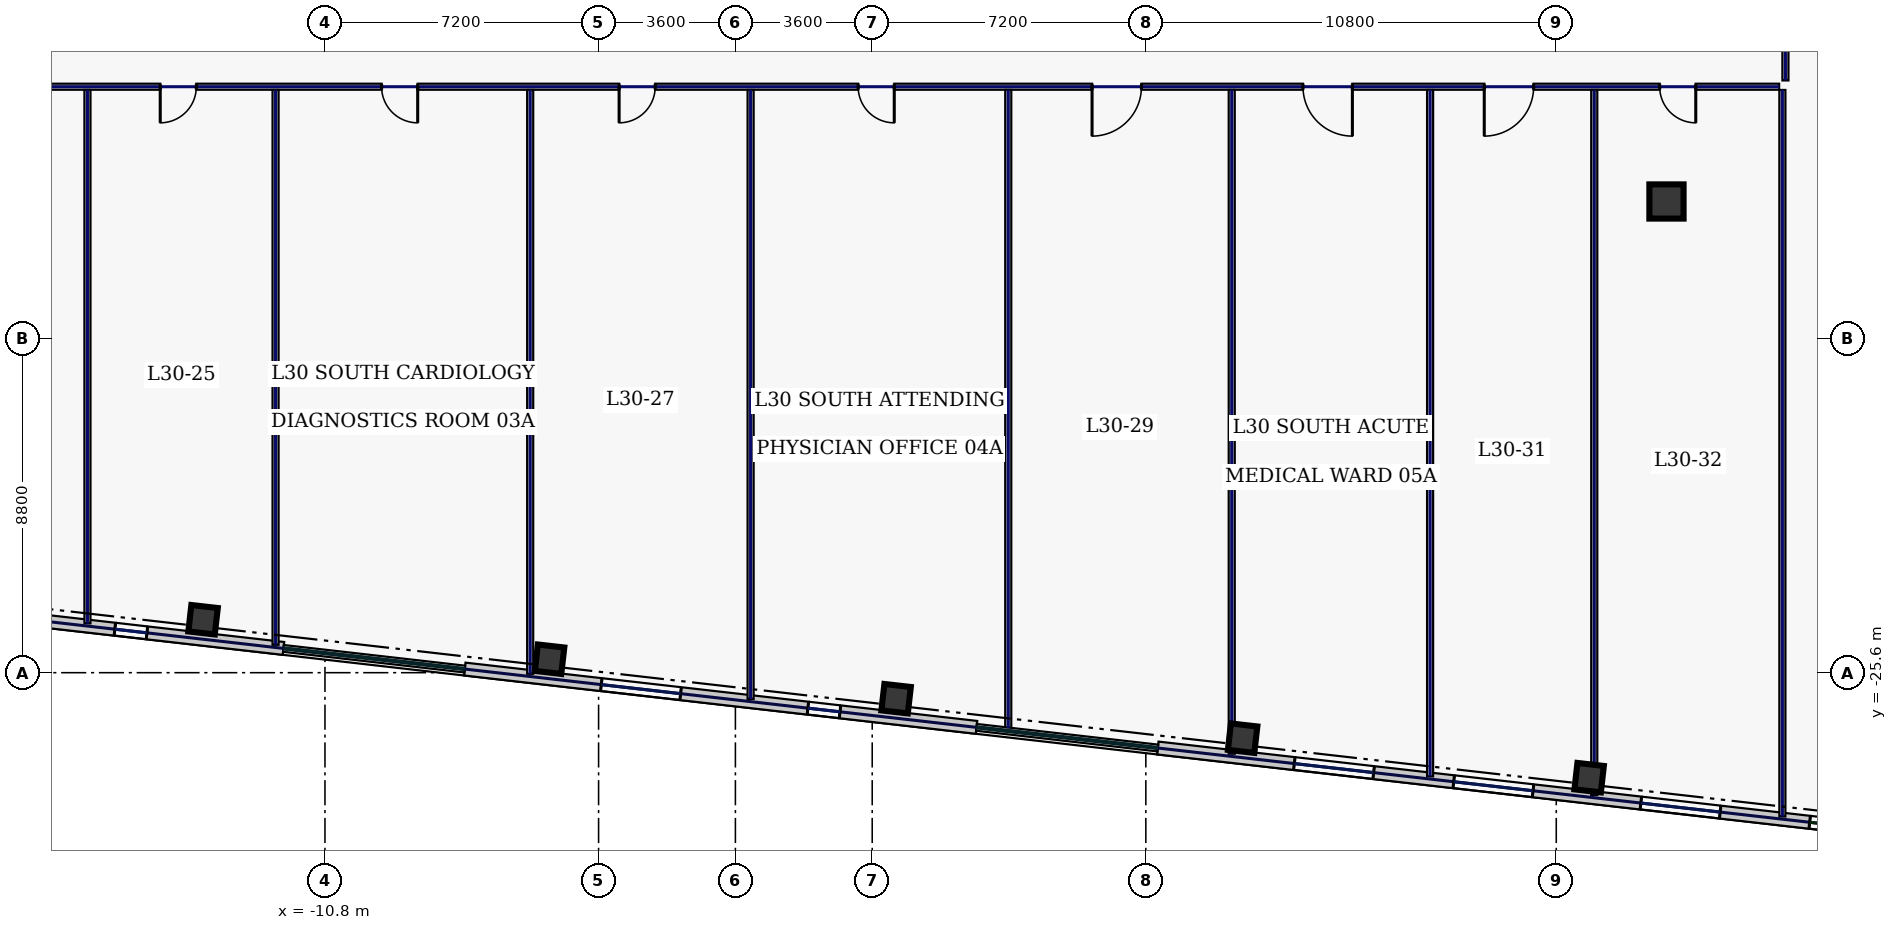
"""IFC4 building model, lengths in metres.
Left out: names, types, materials, properties, quantities, classifications, styles, units other than length and angle.
Written with IfcOpenShell. Run it as: python <this file> out.ifc"""

import sys

from ifc_helpers import new_model, si_unit, direction, frame, frame_2d, origin, origin_2d, place, context, subcontext, project, spatial, rectangle, hollow_rectangle, extrude, element, fill, save


model = new_model("IFC4")
c1 = context("Model", 3, precision=1e-05, world=origin(), true_north=direction((0.0, 1.0)))
c2 = subcontext(c1, "Body", "Model", "MODEL_VIEW")
j1 = project(units=[si_unit("LENGTHUNIT", "METRE"), si_unit("PLANEANGLEUNIT", "RADIAN")], contexts=[c1])
p1 = place(None, origin())
s1 = spatial("IfcSite", under=j1, at=p1, CompositionType="ELEMENT")
p2 = place(p1, origin())
s2 = spatial("IfcBuilding", under=s1, at=p2, CompositionType="ELEMENT")
p3 = place(p2, frame((0.0, 0.0, 133.4)))
s3 = spatial("IfcBuildingStorey", under=s2, at=p3, CompositionType="ELEMENT", Elevation=133.4)
p4 = place(p3, frame((24.5, -13.2, 0.0), z_axis=(0.0, 0.0, 1.0), x_axis=(1.0, 0.0, 0.0)))
e1 = element("IfcColumn", 1, at=p4, inside=s3, PredefinedType="COLUMN", context=c2, shape_type="SweptSolid", body=[
    extrude(hollow_rectangle(XDim=0.9, YDim=0.9, WallThickness=0.04, at=origin_2d()), origin(), (0.0, 0.0, 1.0), 3.74),
])
for number, where, z_axis, x_axis in (
    (2, (-14.008, -24.207, 0.0), (0.0, 0.0, 1.0), (0.994, -0.113, 0.0)),
    (3, (-4.89, -25.246, 0.0), (0.0, 0.0, 1.0), (0.994, -0.113, 0.0)),
    (4, (4.229, -26.284, 0.0), (0.0, 0.0, 1.0), (0.994, -0.113, 0.0)),
    (5, (13.347, -27.323, 0.0), (0.0, 0.0, 1.0), (0.994, -0.113, 0.0)),
    (6, (22.465, -28.362, 0.0), (0.0, 0.0, 1.0), (0.994, -0.113, 0.0)),
):
    element("IfcColumn", number, at=place(p3, frame(where, z_axis=z_axis, x_axis=x_axis)), inside=s3, PredefinedType="COLUMN", context=c2, shape_type="SweptSolid", body=[
        extrude(hollow_rectangle(XDim=0.7, YDim=0.7, WallThickness=0.032, at=origin_2d()), origin(), (0.0, 0.0, 1.0), 3.74),
    ])
p5 = place(p3, frame((-32.977, -22.559, 0.0), z_axis=(0.0, 0.0, 1.0), x_axis=(0.993571214605, -0.113208840243, 0.0)))
e7 = element("IfcWall", 7, at=p5, inside=s3, PredefinedType="STANDARD", context=c2, shape_type="SweptSolid", body=[
    extrude(rectangle(XDim=21.223, YDim=0.34, at=frame_2d((10.611, 0.0))), origin(), (0.0, 0.0, 1.0), 3.74),
])
p6 = place(p5, frame((2.108, 0.0, 0.67)))
e8 = element("IfcOpeningElement", 8, at=p6, cuts=e7, PredefinedType="OPENING", context=c2, shape_type="SweptSolid", body=[
    extrude(rectangle(XDim=2.1, YDim=2.2, at=frame_2d((1.05, 1.1))), frame((0.0, 0.18, 0.0), z_axis=(0.0, -1.0, 0.0), x_axis=(1.0, 0.0, 0.0)), (0.0, 0.0, 1.0), 0.36),
])
p7 = place(p5, frame((6.329, 0.0, 0.67)))
e9 = element("IfcOpeningElement", 9, at=p7, cuts=e7, PredefinedType="OPENING", context=c2, shape_type="SweptSolid", body=[
    extrude(rectangle(XDim=2.1, YDim=2.2, at=frame_2d((1.05, 1.1))), frame((0.0, 0.18, 0.0), z_axis=(0.0, -1.0, 0.0), x_axis=(1.0, 0.0, 0.0)), (0.0, 0.0, 1.0), 0.36),
])
p8 = place(p5, frame((11.285, 0.0, 0.67)))
e10 = element("IfcOpeningElement", 10, at=p8, cuts=e7, PredefinedType="OPENING", context=c2, shape_type="SweptSolid", body=[
    extrude(rectangle(XDim=2.1, YDim=2.2, at=frame_2d((1.05, 1.1))), frame((0.0, 0.18, 0.0), z_axis=(0.0, -1.0, 0.0), x_axis=(1.0, 0.0, 0.0)), (0.0, 0.0, 1.0), 0.36),
])
p9 = place(p5, frame((16.756, 0.0, 0.67)))
e11 = element("IfcOpeningElement", 11, at=p9, cuts=e7, PredefinedType="OPENING", context=c2, shape_type="SweptSolid", body=[
    extrude(rectangle(XDim=0.85, YDim=1.85, at=frame_2d((0.425, 0.925))), frame((0.0, 0.18, 0.0), z_axis=(0.0, -1.0, 0.0), x_axis=(1.0, 0.0, 0.0)), (0.0, 0.0, 1.0), 0.36),
])
p10 = place(p3, frame((-7.122, -25.504, 0.0), z_axis=(0.0, 0.0, 1.0), x_axis=(0.993571685551, -0.11320470693, 0.0)))
e12 = element("IfcWall", 12, at=p10, inside=s3, PredefinedType="STANDARD", context=c2, shape_type="SweptSolid", body=[
    extrude(rectangle(XDim=13.554, YDim=0.34, at=frame_2d((6.777, 0.0))), origin(), (0.0, 0.0, 1.0), 3.74),
])
p11 = place(p10, frame((3.616, 0.0, 0.67)))
e13 = element("IfcOpeningElement", 13, at=p11, cuts=e12, PredefinedType="OPENING", context=c2, shape_type="SweptSolid", body=[
    extrude(rectangle(XDim=2.1, YDim=2.2, at=frame_2d((1.05, 1.1))), frame((0.0, 0.18, 0.0), z_axis=(0.0, -1.0, 0.0), x_axis=(1.0, 0.0, 0.0)), (0.0, 0.0, 1.0), 0.36),
])
p12 = place(p10, frame((9.088, 0.0, 0.67)))
e14 = element("IfcOpeningElement", 14, at=p12, cuts=e12, PredefinedType="OPENING", context=c2, shape_type="SweptSolid", body=[
    extrude(rectangle(XDim=0.85, YDim=1.85, at=frame_2d((0.425, 0.925))), frame((0.0, 0.18, 0.0), z_axis=(0.0, -1.0, 0.0), x_axis=(1.0, 0.0, 0.0)), (0.0, 0.0, 1.0), 0.36),
])
p13 = place(p3, frame((11.115, -27.582, 0.0), z_axis=(0.0, 0.0, 1.0), x_axis=(0.993572655904, -0.113196190044, 0.0)))
e15 = element("IfcWall", 15, at=p13, inside=s3, PredefinedType="STANDARD", context=c2, shape_type="SweptSolid", body=[
    extrude(rectangle(XDim=21.223, YDim=0.34, at=frame_2d((10.611, 0.0))), origin(), (0.0, 0.0, 1.0), 3.74),
])
p14 = place(p13, frame((3.616, 0.0, 0.67)))
e16 = element("IfcOpeningElement", 16, at=p14, cuts=e15, PredefinedType="OPENING", context=c2, shape_type="SweptSolid", body=[
    extrude(rectangle(XDim=2.1, YDim=2.2, at=frame_2d((1.05, 1.1))), frame((0.0, 0.18, 0.0), z_axis=(0.0, -1.0, 0.0), x_axis=(1.0, 0.0, 0.0)), (0.0, 0.0, 1.0), 0.36),
])
p15 = place(p13, frame((7.838, 0.0, 0.67)))
e17 = element("IfcOpeningElement", 17, at=p15, cuts=e15, PredefinedType="OPENING", context=c2, shape_type="SweptSolid", body=[
    extrude(rectangle(XDim=2.1, YDim=2.2, at=frame_2d((1.05, 1.1))), frame((0.0, 0.18, 0.0), z_axis=(0.0, -1.0, 0.0), x_axis=(1.0, 0.0, 0.0)), (0.0, 0.0, 1.0), 0.36),
])
p16 = place(p13, frame((12.794, 0.0, 0.67)))
e18 = element("IfcOpeningElement", 18, at=p16, cuts=e15, PredefinedType="OPENING", context=c2, shape_type="SweptSolid", body=[
    extrude(rectangle(XDim=2.1, YDim=2.2, at=frame_2d((1.05, 1.1))), frame((0.0, 0.18, 0.0), z_axis=(0.0, -1.0, 0.0), x_axis=(1.0, 0.0, 0.0)), (0.0, 0.0, 1.0), 0.36),
])
p17 = place(p13, frame((17.265, 0.0, 0.22)))
e19 = element("IfcOpeningElement", 19, at=p17, cuts=e15, PredefinedType="OPENING", context=c2, shape_type="SweptSolid", body=[
    extrude(rectangle(XDim=1.6, YDim=1.2, at=frame_2d((0.8, 0.6))), frame((0.0, 0.18, 0.0), z_axis=(0.0, -1.0, 0.0), x_axis=(1.0, 0.0, 0.0)), (0.0, 0.0, 1.0), 0.36),
])
p18 = place(p3, frame((27.63, 10.115, 0.0), z_axis=(0.0, 0.0, 1.0), x_axis=(0.0, -1.0, 0.0)))
e20 = element("IfcWall", 20, at=p18, inside=s3, PredefinedType="PARTITIONING", context=c2, shape_type="SweptSolid", body=[
    extrude(rectangle(XDim=20.13, YDim=0.16, at=frame_2d((10.065, 0.0))), origin(), (0.0, 0.0, 1.0), 3.74),
])
p19 = place(p18, frame((17.181, 0.0, 0.0)))
e21 = element("IfcOpeningElement", 21, at=p19, cuts=e20, PredefinedType="OPENING", context=c2, shape_type="SweptSolid", body=[
    extrude(rectangle(XDim=0.95, YDim=2.2, at=frame_2d((0.475, 1.1))), frame((0.0, 0.09, 0.0), z_axis=(0.0, -1.0, 0.0), x_axis=(1.0, 0.0, 0.0)), (0.0, 0.0, 1.0), 0.18),
])
p20 = place(p18, frame((12.325, 0.0, 0.0)))
e22 = element("IfcOpeningElement", 22, at=p20, cuts=e20, PredefinedType="OPENING", context=c2, shape_type="SweptSolid", body=[
    extrude(rectangle(XDim=0.95, YDim=2.2, at=frame_2d((0.475, 1.1))), frame((0.0, 0.09, 0.0), z_axis=(0.0, -1.0, 0.0), x_axis=(1.0, 0.0, 0.0)), (0.0, 0.0, 1.0), 0.18),
])
p21 = place(p18, frame((7.125, 0.0, 0.0)))
e23 = element("IfcOpeningElement", 23, at=p21, cuts=e20, PredefinedType="OPENING", context=c2, shape_type="SweptSolid", body=[
    extrude(rectangle(XDim=0.95, YDim=2.2, at=frame_2d((0.475, 1.1))), frame((0.0, 0.09, 0.0), z_axis=(0.0, -1.0, 0.0), x_axis=(1.0, 0.0, 0.0)), (0.0, 0.0, 1.0), 0.18),
])
p22 = place(p18, frame((2.219, 0.0, 0.0)))
e24 = element("IfcOpeningElement", 24, at=p22, cuts=e20, PredefinedType="OPENING", context=c2, shape_type="SweptSolid", body=[
    extrude(rectangle(XDim=0.95, YDim=2.2, at=frame_2d((0.475, 1.1))), frame((0.0, 0.09, 0.0), z_axis=(0.0, -1.0, 0.0), x_axis=(1.0, 0.0, 0.0)), (0.0, 0.0, 1.0), 0.18),
])
p23 = place(p3, frame((27.465, -10.18, 0.0), z_axis=(0.0, 0.0, 1.0), x_axis=(-1.0, 0.0, 0.0)))
e25 = element("IfcWall", 25, at=p23, inside=s3, PredefinedType="PARTITIONING", context=c2, shape_type="SweptSolid", body=[
    extrude(rectangle(XDim=54.93, YDim=0.16, at=frame_2d((27.465, 0.0))), origin(), (0.0, 0.0, 1.0), 3.74),
])
p24 = place(p23, frame((52.106, 0.0, 0.0)))
e26 = element("IfcOpeningElement", 26, at=p24, cuts=e25, PredefinedType="OPENING", context=c2, shape_type="SweptSolid", body=[
    extrude(rectangle(XDim=0.95, YDim=2.2, at=frame_2d((0.475, 1.1))), frame((0.0, 0.09, 0.0), z_axis=(0.0, -1.0, 0.0), x_axis=(1.0, 0.0, 0.0)), (0.0, 0.0, 1.0), 0.18),
])
p25 = place(p23, frame((47.05, 0.0, 0.0)))
e27 = element("IfcOpeningElement", 27, at=p25, cuts=e25, PredefinedType="OPENING", context=c2, shape_type="SweptSolid", body=[
    extrude(rectangle(XDim=0.95, YDim=2.2, at=frame_2d((0.475, 1.1))), frame((0.0, 0.09, 0.0), z_axis=(0.0, -1.0, 0.0), x_axis=(1.0, 0.0, 0.0)), (0.0, 0.0, 1.0), 0.18),
])
p26 = place(p23, frame((41.65, 0.0, 0.0)))
e28 = element("IfcOpeningElement", 28, at=p26, cuts=e25, PredefinedType="OPENING", context=c2, shape_type="SweptSolid", body=[
    extrude(rectangle(XDim=0.95, YDim=2.2, at=frame_2d((0.475, 1.1))), frame((0.0, 0.09, 0.0), z_axis=(0.0, -1.0, 0.0), x_axis=(1.0, 0.0, 0.0)), (0.0, 0.0, 1.0), 0.18),
])
p27 = place(p23, frame((35.825, 0.0, 0.0)))
e29 = element("IfcOpeningElement", 29, at=p27, cuts=e25, PredefinedType="OPENING", context=c2, shape_type="SweptSolid", body=[
    extrude(rectangle(XDim=0.95, YDim=2.2, at=frame_2d((0.475, 1.1))), frame((0.0, 0.09, 0.0), z_axis=(0.0, -1.0, 0.0), x_axis=(1.0, 0.0, 0.0)), (0.0, 0.0, 1.0), 0.18),
])
p28 = place(p23, frame((29.575, 0.0, 0.0)))
e30 = element("IfcOpeningElement", 30, at=p28, cuts=e25, PredefinedType="OPENING", context=c2, shape_type="SweptSolid", body=[
    extrude(rectangle(XDim=0.95, YDim=2.2, at=frame_2d((0.475, 1.1))), frame((0.0, 0.09, 0.0), z_axis=(0.0, -1.0, 0.0), x_axis=(1.0, 0.0, 0.0)), (0.0, 0.0, 1.0), 0.18),
])
p29 = place(p23, frame((23.285, 0.0, 0.0)))
e31 = element("IfcOpeningElement", 31, at=p29, cuts=e25, PredefinedType="OPENING", context=c2, shape_type="SweptSolid", body=[
    extrude(rectangle(XDim=0.95, YDim=2.2, at=frame_2d((0.475, 1.1))), frame((0.0, 0.09, 0.0), z_axis=(0.0, -1.0, 0.0), x_axis=(1.0, 0.0, 0.0)), (0.0, 0.0, 1.0), 0.18),
])
p30 = place(p23, frame((16.78, 0.0, 0.0)))
e32 = element("IfcOpeningElement", 32, at=p30, cuts=e25, PredefinedType="OPENING", context=c2, shape_type="SweptSolid", body=[
    extrude(rectangle(XDim=1.3, YDim=2.2, at=frame_2d((0.65, 1.1))), frame((0.0, 0.09, 0.0), z_axis=(0.0, -1.0, 0.0), x_axis=(1.0, 0.0, 0.0)), (0.0, 0.0, 1.0), 0.18),
])
p31 = place(p23, frame((11.23, 0.0, 0.0)))
e33 = element("IfcOpeningElement", 33, at=p31, cuts=e25, PredefinedType="OPENING", context=c2, shape_type="SweptSolid", body=[
    extrude(rectangle(XDim=1.3, YDim=2.2, at=frame_2d((0.65, 1.1))), frame((0.0, 0.09, 0.0), z_axis=(0.0, -1.0, 0.0), x_axis=(1.0, 0.0, 0.0)), (0.0, 0.0, 1.0), 0.18),
])
p32 = place(p23, frame((6.46, 0.0, 0.0)))
e34 = element("IfcOpeningElement", 34, at=p32, cuts=e25, PredefinedType="OPENING", context=c2, shape_type="SweptSolid", body=[
    extrude(rectangle(XDim=1.3, YDim=2.2, at=frame_2d((0.65, 1.1))), frame((0.0, 0.09, 0.0), z_axis=(0.0, -1.0, 0.0), x_axis=(1.0, 0.0, 0.0)), (0.0, 0.0, 1.0), 0.18),
])
p33 = place(p23, frame((2.194, 0.0, 0.0)))
e35 = element("IfcOpeningElement", 35, at=p33, cuts=e25, PredefinedType="OPENING", context=c2, shape_type="SweptSolid", body=[
    extrude(rectangle(XDim=0.95, YDim=2.2, at=frame_2d((0.475, 1.1))), frame((0.0, 0.09, 0.0), z_axis=(0.0, -1.0, 0.0), x_axis=(1.0, 0.0, 0.0)), (0.0, 0.0, 1.0), 0.18),
])
p34 = place(p3, frame((27.55, -29.385, 0.0), z_axis=(0.0, 0.0, 1.0), x_axis=(0.0, 1.0, 0.0)))
e36 = element("IfcWall", 36, at=p34, inside=s3, PredefinedType="PARTITIONING", context=c2, shape_type="SweptSolid", body=[
    extrude(rectangle(XDim=19.12, YDim=0.16, at=frame_2d((9.56, 0.0))), origin(), (0.0, 0.0, 1.0), 3.74),
])
p35 = place(p3, frame((-12.1, -24.867, 0.0), z_axis=(0.0, 0.0, 1.0), x_axis=(0.0, 1.0, 0.0)))
e37 = element("IfcWall", 37, at=p35, inside=s3, PredefinedType="PARTITIONING", context=c2, shape_type="SweptSolid", body=[
    extrude(rectangle(XDim=14.602, YDim=0.16, at=frame_2d((7.301, 0.0))), origin(), (0.0, 0.0, 1.0), 3.74),
])
p36 = place(p3, frame((0.4, -26.291, 0.0), z_axis=(0.0, 0.0, 1.0), x_axis=(0.0, 1.0, 0.0)))
e38 = element("IfcWall", 38, at=p36, inside=s3, PredefinedType="PARTITIONING", context=c2, shape_type="SweptSolid", body=[
    extrude(rectangle(XDim=16.026, YDim=0.16, at=frame_2d((8.013, 0.0))), origin(), (0.0, 0.0, 1.0), 3.74),
])
p37 = place(p3, frame((13.06, -27.733, 0.0), z_axis=(0.0, 0.0, 1.0), x_axis=(0.0, 1.0, 0.0)))
e39 = element("IfcWall", 39, at=p37, inside=s3, PredefinedType="PARTITIONING", context=c2, shape_type="SweptSolid", body=[
    extrude(rectangle(XDim=17.469, YDim=0.16, at=frame_2d((8.734, 0.0))), origin(), (0.0, 0.0, 1.0), 3.74),
])
p38 = place(p3, frame((22.6, -28.82, 0.0), z_axis=(0.0, 0.0, 1.0), x_axis=(0.0, 1.0, 0.0)))
e40 = element("IfcWall", 40, at=p38, inside=s3, PredefinedType="PARTITIONING", context=c2, shape_type="SweptSolid", body=[
    extrude(rectangle(XDim=18.555, YDim=0.16, at=frame_2d((9.278, 0.0))), origin(), (0.0, 0.0, 1.0), 3.235),
])
p39 = place(p3, frame((-17.05, -24.303, 0.0), z_axis=(0.0, 0.0, 1.0), x_axis=(0.0, 1.0, 0.0)))
e41 = element("IfcWall", 41, at=p39, inside=s3, PredefinedType="PARTITIONING", context=c2, shape_type="SweptSolid", body=[
    extrude(rectangle(XDim=14.038, YDim=0.16, at=frame_2d((7.019, 0.0))), origin(), (0.0, 0.0, 1.0), 3.74),
])
p40 = place(p3, frame((-5.4, -25.63, 0.0), z_axis=(0.0, 0.0, 1.0), x_axis=(0.0, 1.0, 0.0)))
e42 = element("IfcWall", 42, at=p40, inside=s3, PredefinedType="PARTITIONING", context=c2, shape_type="SweptSolid", body=[
    extrude(rectangle(XDim=15.365, YDim=0.16, at=frame_2d((7.683, 0.0))), origin(), (0.0, 0.0, 1.0), 3.74),
])
p41 = place(p3, frame((7.18, -27.063, 0.0), z_axis=(0.0, 0.0, 1.0), x_axis=(0.0, 1.0, 0.0)))
e43 = element("IfcWall", 43, at=p41, inside=s3, PredefinedType="PARTITIONING", context=c2, shape_type="SweptSolid", body=[
    extrude(rectangle(XDim=16.799, YDim=0.16, at=frame_2d((8.399, 0.0))), origin(), (0.0, 0.0, 1.0), 3.74),
])
p42 = place(p3, frame((18.28, -28.328, 0.0), z_axis=(0.0, 0.0, 1.0), x_axis=(0.0, 1.0, 0.0)))
e44 = element("IfcWall", 44, at=p42, inside=s3, PredefinedType="PARTITIONING", context=c2, shape_type="SweptSolid", body=[
    extrude(rectangle(XDim=18.063, YDim=0.16, at=frame_2d((9.032, 0.0))), origin(), (0.0, 0.0, 1.0), 3.74),
])
p43 = place(p9, origin())
e45 = element("IfcWindow", 45, at=p43, inside=s3, PartitioningType="SINGLE_PANEL", PredefinedType="WINDOW", context=c2, shape_type="SweptSolid", body=[
    extrude(rectangle(XDim=0.85, YDim=1.85, at=frame_2d((0.425, 0.925))), frame((0.0, 0.03, 0.0), z_axis=(0.0, -1.0, 0.0), x_axis=(1.0, 0.0, 0.0)), (0.0, 0.0, 1.0), 0.06),
])
fill(e11, e45)
p44 = place(p11, origin())
e46 = element("IfcWindow", 46, at=p44, inside=s3, PartitioningType="SINGLE_PANEL", PredefinedType="WINDOW", context=c2, shape_type="SweptSolid", body=[
    extrude(rectangle(XDim=2.1, YDim=2.2, at=frame_2d((1.05, 1.1))), frame((0.0, 0.03, 0.0), z_axis=(0.0, -1.0, 0.0), x_axis=(1.0, 0.0, 0.0)), (0.0, 0.0, 1.0), 0.06),
])
fill(e13, e46)
p45 = place(p12, origin())
e47 = element("IfcWindow", 47, at=p45, inside=s3, PartitioningType="SINGLE_PANEL", PredefinedType="WINDOW", context=c2, shape_type="SweptSolid", body=[
    extrude(rectangle(XDim=0.85, YDim=1.85, at=frame_2d((0.425, 0.925))), frame((0.0, 0.03, 0.0), z_axis=(0.0, -1.0, 0.0), x_axis=(1.0, 0.0, 0.0)), (0.0, 0.0, 1.0), 0.06),
])
fill(e14, e47)
p46 = place(p14, origin())
e48 = element("IfcWindow", 48, at=p46, inside=s3, PartitioningType="SINGLE_PANEL", PredefinedType="WINDOW", context=c2, shape_type="SweptSolid", body=[
    extrude(rectangle(XDim=2.1, YDim=2.2, at=frame_2d((1.05, 1.1))), frame((0.0, 0.03, 0.0), z_axis=(0.0, -1.0, 0.0), x_axis=(1.0, 0.0, 0.0)), (0.0, 0.0, 1.0), 0.06),
])
fill(e16, e48)
p47 = place(p15, origin())
e49 = element("IfcWindow", 49, at=p47, inside=s3, PartitioningType="SINGLE_PANEL", PredefinedType="WINDOW", context=c2, shape_type="SweptSolid", body=[
    extrude(rectangle(XDim=2.1, YDim=2.2, at=frame_2d((1.05, 1.1))), frame((0.0, 0.03, 0.0), z_axis=(0.0, -1.0, 0.0), x_axis=(1.0, 0.0, 0.0)), (0.0, 0.0, 1.0), 0.06),
])
fill(e17, e49)
p48 = place(p16, origin())
e50 = element("IfcWindow", 50, at=p48, inside=s3, PartitioningType="SINGLE_PANEL", PredefinedType="WINDOW", context=c2, shape_type="SweptSolid", body=[
    extrude(rectangle(XDim=2.1, YDim=2.2, at=frame_2d((1.05, 1.1))), frame((0.0, 0.03, 0.0), z_axis=(0.0, -1.0, 0.0), x_axis=(1.0, 0.0, 0.0)), (0.0, 0.0, 1.0), 0.06),
])
fill(e18, e50)
p49 = place(p17, origin())
e51 = element("IfcWindow", 51, at=p49, inside=s3, PartitioningType="SINGLE_PANEL", PredefinedType="WINDOW", context=c2, shape_type="SweptSolid", body=[
    extrude(rectangle(XDim=1.6, YDim=1.2, at=frame_2d((0.8, 0.6))), frame((0.0, 0.03, 0.0), z_axis=(0.0, -1.0, 0.0), x_axis=(1.0, 0.0, 0.0)), (0.0, 0.0, 1.0), 0.06),
])
fill(e19, e51)
p50 = place(p26, origin())
e52 = element("IfcDoor", 52, at=p50, inside=s3, OperationType="SINGLE_SWING_RIGHT", PredefinedType="DOOR", context=c2, shape_type="SweptSolid", body=[
    extrude(rectangle(XDim=0.95, YDim=2.2, at=frame_2d((0.475, 1.1))), frame((0.0, 0.025, 0.0), z_axis=(0.0, -1.0, 0.0), x_axis=(1.0, 0.0, 0.0)), (0.0, 0.0, 1.0), 0.05),
])
fill(e28, e52)
p51 = place(p27, origin())
e53 = element("IfcDoor", 53, at=p51, inside=s3, OperationType="SINGLE_SWING_LEFT", PredefinedType="DOOR", context=c2, shape_type="SweptSolid", body=[
    extrude(rectangle(XDim=0.95, YDim=2.2, at=frame_2d((0.475, 1.1))), frame((0.0, 0.025, 0.0), z_axis=(0.0, -1.0, 0.0), x_axis=(1.0, 0.0, 0.0)), (0.0, 0.0, 1.0), 0.05),
])
fill(e29, e53)
p52 = place(p28, origin())
e54 = element("IfcDoor", 54, at=p52, inside=s3, OperationType="SINGLE_SWING_RIGHT", PredefinedType="DOOR", context=c2, shape_type="SweptSolid", body=[
    extrude(rectangle(XDim=0.95, YDim=2.2, at=frame_2d((0.475, 1.1))), frame((0.0, 0.025, 0.0), z_axis=(0.0, -1.0, 0.0), x_axis=(1.0, 0.0, 0.0)), (0.0, 0.0, 1.0), 0.05),
])
fill(e30, e54)
p53 = place(p29, origin())
e55 = element("IfcDoor", 55, at=p53, inside=s3, OperationType="SINGLE_SWING_LEFT", PredefinedType="DOOR", context=c2, shape_type="SweptSolid", body=[
    extrude(rectangle(XDim=0.95, YDim=2.2, at=frame_2d((0.475, 1.1))), frame((0.0, 0.025, 0.0), z_axis=(0.0, -1.0, 0.0), x_axis=(1.0, 0.0, 0.0)), (0.0, 0.0, 1.0), 0.05),
])
fill(e31, e55)
p54 = place(p30, origin())
e56 = element("IfcDoor", 56, at=p54, inside=s3, OperationType="SINGLE_SWING_RIGHT", PredefinedType="DOOR", context=c2, shape_type="SweptSolid", body=[
    extrude(rectangle(XDim=1.3, YDim=2.2, at=frame_2d((0.65, 1.1))), frame((0.0, 0.025, 0.0), z_axis=(0.0, -1.0, 0.0), x_axis=(1.0, 0.0, 0.0)), (0.0, 0.0, 1.0), 0.05),
])
fill(e32, e56)
p55 = place(p31, origin())
e57 = element("IfcDoor", 57, at=p55, inside=s3, OperationType="SINGLE_SWING_LEFT", PredefinedType="DOOR", context=c2, shape_type="SweptSolid", body=[
    extrude(rectangle(XDim=1.3, YDim=2.2, at=frame_2d((0.65, 1.1))), frame((0.0, 0.025, 0.0), z_axis=(0.0, -1.0, 0.0), x_axis=(1.0, 0.0, 0.0)), (0.0, 0.0, 1.0), 0.05),
])
fill(e33, e57)
p56 = place(p32, origin())
e58 = element("IfcDoor", 58, at=p56, inside=s3, OperationType="SINGLE_SWING_RIGHT", PredefinedType="DOOR", context=c2, shape_type="SweptSolid", body=[
    extrude(rectangle(XDim=1.3, YDim=2.2, at=frame_2d((0.65, 1.1))), frame((0.0, 0.025, 0.0), z_axis=(0.0, -1.0, 0.0), x_axis=(1.0, 0.0, 0.0)), (0.0, 0.0, 1.0), 0.05),
])
fill(e34, e58)
p57 = place(p33, origin())
e59 = element("IfcDoor", 59, at=p57, inside=s3, OperationType="SINGLE_SWING_LEFT", PredefinedType="DOOR", context=c2, shape_type="SweptSolid", body=[
    extrude(rectangle(XDim=0.95, YDim=2.2, at=frame_2d((0.475, 1.1))), frame((0.0, 0.025, 0.0), z_axis=(0.0, -1.0, 0.0), x_axis=(1.0, 0.0, 0.0)), (0.0, 0.0, 1.0), 0.05),
])
fill(e35, e59)
save(model, sys.argv[1])
